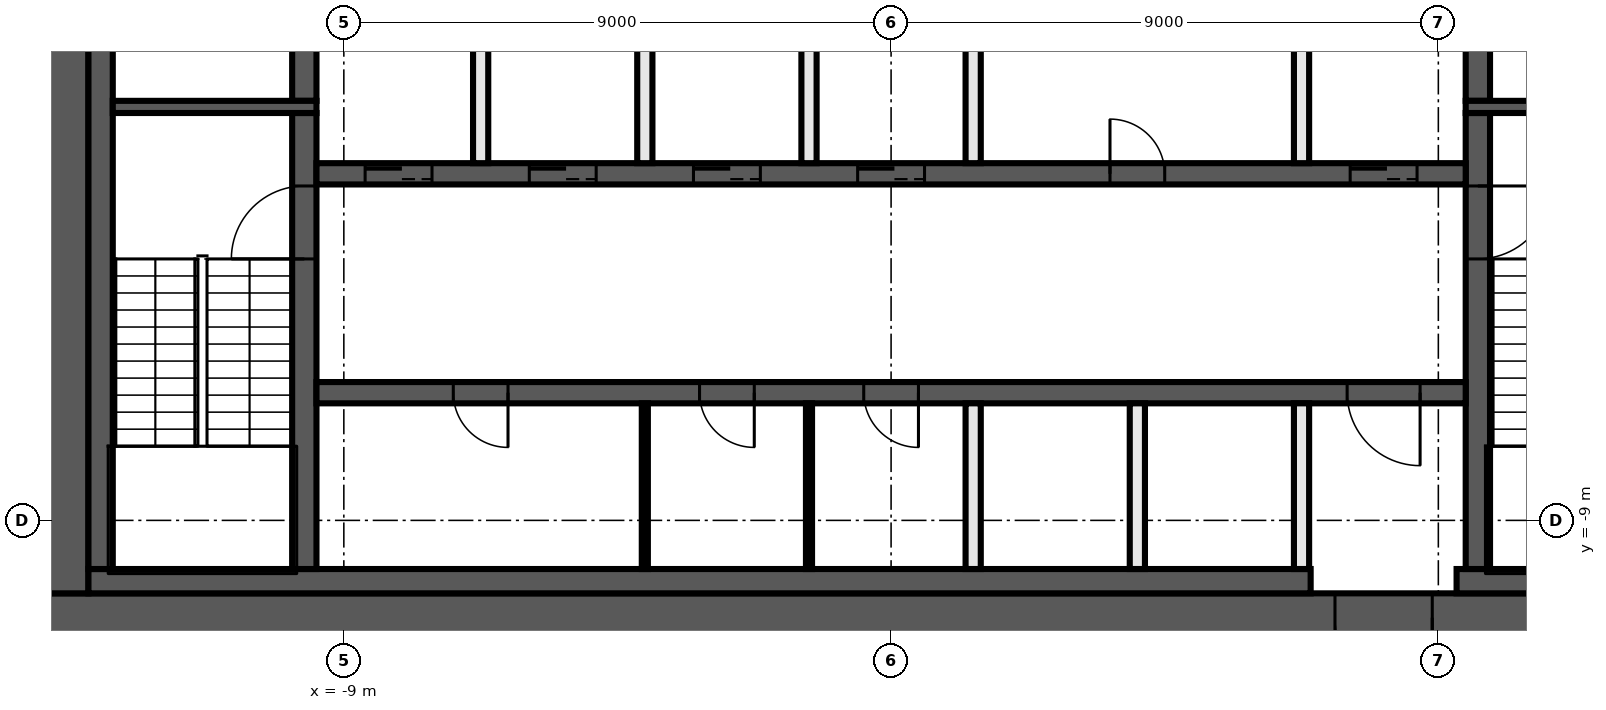
"""IFC4 building model, lengths in metres.
Left out: names, types, materials, properties, quantities, classifications, styles, units other than length and angle.
Written with IfcOpenShell. Run it as: python <this file> out.ifc"""

import sys

from ifc_helpers import new_model, si_unit, direction, frame, frame_2d, origin, place, context, subcontext, project, spatial, rectangle, extrude, element, fill, save


model = new_model("IFC4")
c1 = context("Model", 3, precision=1e-05, world=origin(), true_north=direction((0.0, 1.0)))
c2 = subcontext(c1, "Body", "Model", "MODEL_VIEW")
j1 = project(units=[si_unit("LENGTHUNIT", "METRE"), si_unit("PLANEANGLEUNIT", "RADIAN")], contexts=[c1])
p1 = place(None, origin())
s1 = spatial("IfcSite", under=j1, at=p1, CompositionType="ELEMENT")
p2 = place(p1, origin())
s2 = spatial("IfcBuilding", under=s1, at=p2, CompositionType="ELEMENT")
p3 = place(p2, frame((0.0, 0.0, 211.4)))
s3 = spatial("IfcBuildingStorey", under=s2, at=p3, CompositionType="ELEMENT", Elevation=211.4)
p4 = place(p3, frame((14.0, -10.6, 0.0), z_axis=(0.0, 0.0, 1.0), x_axis=(-1.0, 0.0, 0.0)))
e1 = element("IfcWall", 1, at=p4, inside=s3, PredefinedType="SHEAR", context=c2, shape_type="SweptSolid", body=[
    extrude(rectangle(XDim=28.0, YDim=0.8, at=frame_2d((14.0, 0.0))), origin(), (0.0, 0.0, 1.0), 3.82),
])
p5 = place(p4, frame((5.1, 0.0, 0.0)))
e2 = element("IfcOpeningElement", 2, at=p5, cuts=e1, PredefinedType="OPENING", context=c2, shape_type="SweptSolid", body=[
    extrude(rectangle(XDim=1.6, YDim=2.1, at=frame_2d((0.8, 1.05))), frame((0.0, 0.41, 0.0), z_axis=(0.0, -1.0, 0.0), x_axis=(1.0, 0.0, 0.0)), (0.0, 0.0, 1.0), 0.82),
])
p6 = place(p3, frame((-13.6, -10.2, 0.0), z_axis=(0.0, 0.0, 1.0), x_axis=(0.0, 1.0, 0.0)))
e3 = element("IfcWall", 3, at=p6, inside=s3, PredefinedType="SHEAR", context=c2, shape_type="SweptSolid", body=[
    extrude(rectangle(XDim=20.4, YDim=0.8, at=frame_2d((10.2, 0.0))), origin(), (0.0, 0.0, 1.0), 3.82),
])
p7 = place(p3, frame((13.2, -10.0, 0.0), z_axis=(0.0, 0.0, 1.0), x_axis=(-1.0, 0.0, 0.0)))
e4 = element("IfcWall", 4, at=p7, inside=s3, PredefinedType="SHEAR", context=c2, shape_type="SweptSolid", body=[
    extrude(rectangle(XDim=3.9, YDim=0.4, at=frame_2d((1.95, 0.0))), origin(), (0.0, 0.0, 1.0), 3.82),
])
p8 = place(p3, frame((6.9, -10.0, 0.0), z_axis=(0.0, 0.0, 1.0), x_axis=(-1.0, 0.0, 0.0)))
e5 = element("IfcWall", 5, at=p8, inside=s3, PredefinedType="SHEAR", context=c2, shape_type="SweptSolid", body=[
    extrude(rectangle(XDim=20.1, YDim=0.4, at=frame_2d((10.05, 0.0))), origin(), (0.0, 0.0, 1.0), 3.82),
])
p9 = place(p3, frame((-13.0, -9.8, 0.0), z_axis=(0.0, 0.0, 1.0), x_axis=(0.0, 1.0, 0.0)))
e6 = element("IfcWall", 6, at=p9, inside=s3, PredefinedType="SHEAR", context=c2, shape_type="SweptSolid", body=[
    extrude(rectangle(XDim=19.6, YDim=0.4, at=frame_2d((9.8, 0.0))), origin(), (0.0, 0.0, 1.0), 3.82),
])
p10 = place(p3, frame((9.65, -2.3, 0.0), z_axis=(0.0, 0.0, 1.0), x_axis=(0.0, -1.0, 0.0)))
e7 = element("IfcWall", 7, at=p10, inside=s3, PredefinedType="SHEAR", context=c2, shape_type="SweptSolid", body=[
    extrude(rectangle(XDim=7.5, YDim=0.4, at=frame_2d((3.75, 0.0))), origin(), (0.0, 0.0, 1.0), 3.82),
])
p11 = place(p10, frame((1.2, 0.0, 0.0)))
e8 = element("IfcOpeningElement", 8, at=p11, cuts=e7, PredefinedType="OPENING", context=c2, shape_type="SweptSolid", body=[
    extrude(rectangle(XDim=1.2, YDim=2.1, at=frame_2d((0.6, 1.05))), frame((0.0, 0.21, 0.0), z_axis=(0.0, -1.0, 0.0), x_axis=(1.0, 0.0, 0.0)), (0.0, 0.0, 1.0), 0.42),
])
p12 = place(p3, frame((9.65, 2.1, 0.0), z_axis=(0.0, 0.0, 1.0), x_axis=(0.0, -1.0, 0.0)))
e9 = element("IfcWall", 9, at=p12, inside=s3, PredefinedType="SHEAR", context=c2, shape_type="SweptSolid", body=[
    extrude(rectangle(XDim=4.2, YDim=0.4, at=frame_2d((2.1, 0.0))), origin(), (0.0, 0.0, 1.0), 3.82),
])
p13 = place(p12, frame((0.15, 0.0, 0.0)))
e10 = element("IfcOpeningElement", 10, at=p13, cuts=e9, PredefinedType="OPENING", context=c2, shape_type="SweptSolid", body=[
    extrude(rectangle(XDim=0.9, YDim=2.1, at=frame_2d((0.45, 1.05))), frame((0.0, 0.21, 0.0), z_axis=(0.0, -1.0, 0.0), x_axis=(1.0, 0.0, 0.0)), (0.0, 0.0, 1.0), 0.42),
])
p14 = place(p3, frame((-9.65, -9.8, 0.0), z_axis=(0.0, 0.0, 1.0), x_axis=(0.0, 1.0, 0.0)))
e11 = element("IfcWall", 11, at=p14, inside=s3, PredefinedType="SHEAR", context=c2, shape_type="SweptSolid", body=[
    extrude(rectangle(XDim=7.5, YDim=0.4, at=frame_2d((3.75, 0.0))), origin(), (0.0, 0.0, 1.0), 3.82),
])
p15 = place(p14, frame((5.1, 0.0, 0.0)))
e12 = element("IfcOpeningElement", 12, at=p15, cuts=e11, PredefinedType="OPENING", context=c2, shape_type="SweptSolid", body=[
    extrude(rectangle(XDim=1.2, YDim=2.1, at=frame_2d((0.6, 1.05))), frame((0.0, 0.21, 0.0), z_axis=(0.0, -1.0, 0.0), x_axis=(1.0, 0.0, 0.0)), (0.0, 0.0, 1.0), 0.42),
])
p16 = place(p3, frame((-9.65, -2.1, 0.0), z_axis=(0.0, 0.0, 1.0), x_axis=(0.0, 1.0, 0.0)))
e13 = element("IfcWall", 13, at=p16, inside=s3, PredefinedType="SHEAR", context=c2, shape_type="SweptSolid", body=[
    extrude(rectangle(XDim=4.2, YDim=0.4, at=frame_2d((2.1, 0.0))), origin(), (0.0, 0.0, 1.0), 3.82),
])
for number, where, z_axis, x_axis in (
    (14, (9.45, -2.2, 0.0), (0.0, 0.0, 1.0), (1.0, 0.0, 0.0)),
    (15, (-9.45, -2.2, 0.0), (0.0, 0.0, 1.0), (-1.0, 0.0, 0.0)),
):
    element("IfcWall", number, at=place(p3, frame(where, z_axis=z_axis, x_axis=x_axis)), inside=s3, PredefinedType="SHEAR", context=c2, shape_type="SweptSolid", body=[
        extrude(rectangle(XDim=3.35, YDim=0.2, at=frame_2d((1.675, 0.0))), origin(), (0.0, 0.0, 1.0), 3.82),
    ])
p17 = place(p3, frame((-9.45, -3.3, 0.0), z_axis=(0.0, 0.0, 1.0), x_axis=(1.0, 0.0, 0.0)))
e16 = element("IfcWall", 16, at=p17, inside=s3, PredefinedType="SHEAR", context=c2, shape_type="SweptSolid", body=[
    extrude(rectangle(XDim=18.9, YDim=0.35, at=frame_2d((9.45, 0.0))), origin(), (0.0, 0.0, 1.0), 3.82),
])
p18 = place(p17, frame((0.8, 0.0, 0.0)))
e17 = element("IfcOpeningElement", 17, at=p18, cuts=e16, PredefinedType="OPENING", context=c2, shape_type="SweptSolid", body=[
    extrude(rectangle(XDim=1.1, YDim=2.1, at=frame_2d((0.55, 1.05))), frame((0.0, 0.185, 0.0), z_axis=(0.0, -1.0, 0.0), x_axis=(1.0, 0.0, 0.0)), (0.0, 0.0, 1.0), 0.37),
])
p19 = place(p17, frame((3.5, 0.0, 0.0)))
e18 = element("IfcOpeningElement", 18, at=p19, cuts=e16, PredefinedType="OPENING", context=c2, shape_type="SweptSolid", body=[
    extrude(rectangle(XDim=1.1, YDim=2.1, at=frame_2d((0.55, 1.05))), frame((0.0, 0.185, 0.0), z_axis=(0.0, -1.0, 0.0), x_axis=(1.0, 0.0, 0.0)), (0.0, 0.0, 1.0), 0.37),
])
p20 = place(p17, frame((6.2, 0.0, 0.0)))
e19 = element("IfcOpeningElement", 19, at=p20, cuts=e16, PredefinedType="OPENING", context=c2, shape_type="SweptSolid", body=[
    extrude(rectangle(XDim=1.1, YDim=2.1, at=frame_2d((0.55, 1.05))), frame((0.0, 0.185, 0.0), z_axis=(0.0, -1.0, 0.0), x_axis=(1.0, 0.0, 0.0)), (0.0, 0.0, 1.0), 0.37),
])
p21 = place(p17, frame((8.9, 0.0, 0.0)))
e20 = element("IfcOpeningElement", 20, at=p21, cuts=e16, PredefinedType="OPENING", context=c2, shape_type="SweptSolid", body=[
    extrude(rectangle(XDim=1.1, YDim=2.1, at=frame_2d((0.55, 1.05))), frame((0.0, 0.185, 0.0), z_axis=(0.0, -1.0, 0.0), x_axis=(1.0, 0.0, 0.0)), (0.0, 0.0, 1.0), 0.37),
])
p22 = place(p17, frame((17.0, 0.0, 0.0)))
e21 = element("IfcOpeningElement", 21, at=p22, cuts=e16, PredefinedType="OPENING", context=c2, shape_type="SweptSolid", body=[
    extrude(rectangle(XDim=1.1, YDim=2.1, at=frame_2d((0.55, 1.05))), frame((0.0, 0.185, 0.0), z_axis=(0.0, -1.0, 0.0), x_axis=(1.0, 0.0, 0.0)), (0.0, 0.0, 1.0), 0.37),
])
p23 = place(p17, frame((13.05, 0.0, 0.0)))
e22 = element("IfcOpeningElement", 22, at=p23, cuts=e16, PredefinedType="OPENING", context=c2, shape_type="SweptSolid", body=[
    extrude(rectangle(XDim=0.9, YDim=2.1, at=frame_2d((0.45, 1.05))), frame((0.0, 0.185, 0.0), z_axis=(0.0, -1.0, 0.0), x_axis=(1.0, 0.0, 0.0)), (0.0, 0.0, 1.0), 0.37),
])
p24 = place(p3, frame((9.45, -6.9, 0.0), z_axis=(0.0, 0.0, 1.0), x_axis=(-1.0, 0.0, 0.0)))
e23 = element("IfcWall", 23, at=p24, inside=s3, PredefinedType="SHEAR", context=c2, shape_type="SweptSolid", body=[
    extrude(rectangle(XDim=18.9, YDim=0.35, at=frame_2d((9.45, 0.0))), origin(), (0.0, 0.0, 1.0), 3.82),
])
p25 = place(p24, frame((0.75, 0.0, 0.0)))
e24 = element("IfcOpeningElement", 24, at=p25, cuts=e23, PredefinedType="OPENING", context=c2, shape_type="SweptSolid", body=[
    extrude(rectangle(XDim=1.2, YDim=2.1, at=frame_2d((0.6, 1.05))), frame((0.0, 0.185, 0.0), z_axis=(0.0, -1.0, 0.0), x_axis=(1.0, 0.0, 0.0)), (0.0, 0.0, 1.0), 0.37),
])
p26 = place(p24, frame((15.75, 0.0, 0.0)))
e25 = element("IfcOpeningElement", 25, at=p26, cuts=e23, PredefinedType="OPENING", context=c2, shape_type="SweptSolid", body=[
    extrude(rectangle(XDim=0.9, YDim=2.1, at=frame_2d((0.45, 1.05))), frame((0.0, 0.185, 0.0), z_axis=(0.0, -1.0, 0.0), x_axis=(1.0, 0.0, 0.0)), (0.0, 0.0, 1.0), 0.37),
])
p27 = place(p24, frame((11.7, 0.0, 0.0)))
e26 = element("IfcOpeningElement", 26, at=p27, cuts=e23, PredefinedType="OPENING", context=c2, shape_type="SweptSolid", body=[
    extrude(rectangle(XDim=0.9, YDim=2.1, at=frame_2d((0.45, 1.05))), frame((0.0, 0.185, 0.0), z_axis=(0.0, -1.0, 0.0), x_axis=(1.0, 0.0, 0.0)), (0.0, 0.0, 1.0), 0.37),
])
p28 = place(p24, frame((9.0, 0.0, 0.0)))
e27 = element("IfcOpeningElement", 27, at=p28, cuts=e23, PredefinedType="OPENING", context=c2, shape_type="SweptSolid", body=[
    extrude(rectangle(XDim=0.9, YDim=2.1, at=frame_2d((0.45, 1.05))), frame((0.0, 0.185, 0.0), z_axis=(0.0, -1.0, 0.0), x_axis=(1.0, 0.0, 0.0)), (0.0, 0.0, 1.0), 0.37),
])
for number, where, z_axis, x_axis in (
    (28, (6.75, -9.8, 0.0), (0.0, 0.0, 1.0), (0.0, 1.0, 0.0)),
    (29, (6.75, -3.125, 0.0), (0.0, 0.0, 1.0), (0.0, 1.0, 0.0)),
    (30, (4.05, -9.8, 0.0), (0.0, 0.0, 1.0), (0.0, 1.0, 0.0)),
    (31, (1.35, -9.8, 0.0), (0.0, 0.0, 1.0), (0.0, 1.0, 0.0)),
    (32, (1.35, -3.125, 0.0), (0.0, 0.0, 1.0), (0.0, 1.0, 0.0)),
):
    element("IfcWall", number, at=place(p3, frame(where, z_axis=z_axis, x_axis=x_axis)), inside=s3, PredefinedType="SOLIDWALL", context=c2, shape_type="SweptSolid", body=[
        extrude(rectangle(XDim=2.725, YDim=0.25, at=frame_2d((1.363, 0.0))), origin(), (0.0, 0.0, 1.0), 3.82),
    ])
p29 = place(p3, frame((-1.35, -9.8, 0.0), z_axis=(0.0, 0.0, 1.0), x_axis=(0.0, 1.0, 0.0)))
e33 = element("IfcWall", 33, at=p29, inside=s3, PredefinedType="PARTITIONING", context=c2, shape_type="SweptSolid", body=[
    extrude(rectangle(XDim=2.725, YDim=0.1, at=frame_2d((1.363, 0.0))), origin(), (0.0, 0.0, 1.0), 3.82),
])
p30 = place(p3, frame((-1.35, -3.125, 0.0), z_axis=(0.0, 0.0, 1.0), x_axis=(0.0, 1.0, 0.0)))
e34 = element("IfcWall", 34, at=p30, inside=s3, PredefinedType="SOLIDWALL", context=c2, shape_type="SweptSolid", body=[
    extrude(rectangle(XDim=2.725, YDim=0.25, at=frame_2d((1.363, 0.0))), origin(), (0.0, 0.0, 1.0), 3.82),
])
p31 = place(p3, frame((-4.05, -9.8, 0.0), z_axis=(0.0, 0.0, 1.0), x_axis=(0.0, 1.0, 0.0)))
e35 = element("IfcWall", 35, at=p31, inside=s3, PredefinedType="PARTITIONING", context=c2, shape_type="SweptSolid", body=[
    extrude(rectangle(XDim=2.725, YDim=0.1, at=frame_2d((1.363, 0.0))), origin(), (0.0, 0.0, 1.0), 3.82),
])
for number, where, z_axis, x_axis in (
    (36, (-4.05, -3.125, 0.0), (0.0, 0.0, 1.0), (0.0, 1.0, 0.0)),
    (37, (-6.75, -3.125, 0.0), (0.0, 0.0, 1.0), (0.0, 1.0, 0.0)),
):
    element("IfcWall", number, at=place(p3, frame(where, z_axis=z_axis, x_axis=x_axis)), inside=s3, PredefinedType="SOLIDWALL", context=c2, shape_type="SweptSolid", body=[
        extrude(rectangle(XDim=2.725, YDim=0.25, at=frame_2d((1.363, 0.0))), origin(), (0.0, 0.0, 1.0), 3.82),
    ])
p32 = place(p18, origin())
e38 = element("IfcDoor", 38, at=p32, inside=s3, OperationType="DOUBLE_DOOR_SLIDING", PredefinedType="DOOR", context=c2, shape_type="SweptSolid", body=[
    extrude(rectangle(XDim=1.1, YDim=2.1, at=frame_2d((0.55, 1.05))), frame((0.0, 0.025, 0.0), z_axis=(0.0, -1.0, 0.0), x_axis=(1.0, 0.0, 0.0)), (0.0, 0.0, 1.0), 0.05),
])
fill(e17, e38)
p33 = place(p19, origin())
e39 = element("IfcDoor", 39, at=p33, inside=s3, OperationType="DOUBLE_DOOR_SLIDING", PredefinedType="DOOR", context=c2, shape_type="SweptSolid", body=[
    extrude(rectangle(XDim=1.1, YDim=2.1, at=frame_2d((0.55, 1.05))), frame((0.0, 0.025, 0.0), z_axis=(0.0, -1.0, 0.0), x_axis=(1.0, 0.0, 0.0)), (0.0, 0.0, 1.0), 0.05),
])
fill(e18, e39)
p34 = place(p20, origin())
e40 = element("IfcDoor", 40, at=p34, inside=s3, OperationType="DOUBLE_DOOR_SLIDING", PredefinedType="DOOR", context=c2, shape_type="SweptSolid", body=[
    extrude(rectangle(XDim=1.1, YDim=2.1, at=frame_2d((0.55, 1.05))), frame((0.0, 0.025, 0.0), z_axis=(0.0, -1.0, 0.0), x_axis=(1.0, 0.0, 0.0)), (0.0, 0.0, 1.0), 0.05),
])
fill(e19, e40)
p35 = place(p21, origin())
e41 = element("IfcDoor", 41, at=p35, inside=s3, OperationType="DOUBLE_DOOR_SLIDING", PredefinedType="DOOR", context=c2, shape_type="SweptSolid", body=[
    extrude(rectangle(XDim=1.1, YDim=2.1, at=frame_2d((0.55, 1.05))), frame((0.0, 0.025, 0.0), z_axis=(0.0, -1.0, 0.0), x_axis=(1.0, 0.0, 0.0)), (0.0, 0.0, 1.0), 0.05),
])
fill(e20, e41)
p36 = place(p22, origin())
e42 = element("IfcDoor", 42, at=p36, inside=s3, OperationType="DOUBLE_DOOR_SLIDING", PredefinedType="DOOR", context=c2, shape_type="SweptSolid", body=[
    extrude(rectangle(XDim=1.1, YDim=2.1, at=frame_2d((0.55, 1.05))), frame((0.0, 0.025, 0.0), z_axis=(0.0, -1.0, 0.0), x_axis=(1.0, 0.0, 0.0)), (0.0, 0.0, 1.0), 0.05),
])
fill(e21, e42)
p37 = place(p5, origin())
e43 = element("IfcDoor", 43, at=p37, inside=s3, OperationType="DOUBLE_DOOR_SINGLE_SWING", PredefinedType="DOOR", context=c2, shape_type="SweptSolid", body=[
    extrude(rectangle(XDim=1.6, YDim=2.1, at=frame_2d((0.8, 1.05))), frame((0.0, 0.025, 0.0), z_axis=(0.0, -1.0, 0.0), x_axis=(1.0, 0.0, 0.0)), (0.0, 0.0, 1.0), 0.05),
])
fill(e2, e43)
p38 = place(p25, origin())
e44 = element("IfcDoor", 44, at=p38, inside=s3, OperationType="SINGLE_SWING_LEFT", PredefinedType="DOOR", context=c2, shape_type="SweptSolid", body=[
    extrude(rectangle(XDim=1.2, YDim=2.1, at=frame_2d((0.6, 1.05))), frame((0.0, 0.025, 0.0), z_axis=(0.0, -1.0, 0.0), x_axis=(1.0, 0.0, 0.0)), (0.0, 0.0, 1.0), 0.05),
])
fill(e24, e44)
p39 = place(p23, origin())
e45 = element("IfcDoor", 45, at=p39, inside=s3, OperationType="SINGLE_SWING_RIGHT", PredefinedType="DOOR", context=c2, shape_type="SweptSolid", body=[
    extrude(rectangle(XDim=0.9, YDim=2.1, at=frame_2d((0.45, 1.05))), frame((0.0, 0.025, 0.0), z_axis=(0.0, -1.0, 0.0), x_axis=(1.0, 0.0, 0.0)), (0.0, 0.0, 1.0), 0.05),
])
fill(e22, e45)
p40 = place(p26, origin())
e46 = element("IfcDoor", 46, at=p40, inside=s3, OperationType="SINGLE_SWING_LEFT", PredefinedType="DOOR", context=c2, shape_type="SweptSolid", body=[
    extrude(rectangle(XDim=0.9, YDim=2.1, at=frame_2d((0.45, 1.05))), frame((0.0, 0.025, 0.0), z_axis=(0.0, -1.0, 0.0), x_axis=(1.0, 0.0, 0.0)), (0.0, 0.0, 1.0), 0.05),
])
fill(e25, e46)
p41 = place(p27, origin())
e47 = element("IfcDoor", 47, at=p41, inside=s3, OperationType="SINGLE_SWING_RIGHT", PredefinedType="DOOR", context=c2, shape_type="SweptSolid", body=[
    extrude(rectangle(XDim=0.9, YDim=2.1, at=frame_2d((0.45, 1.05))), frame((0.0, 0.025, 0.0), z_axis=(0.0, -1.0, 0.0), x_axis=(1.0, 0.0, 0.0)), (0.0, 0.0, 1.0), 0.05),
])
fill(e26, e47)
p42 = place(p28, origin())
e48 = element("IfcDoor", 48, at=p42, inside=s3, OperationType="SINGLE_SWING_LEFT", PredefinedType="DOOR", context=c2, shape_type="SweptSolid", body=[
    extrude(rectangle(XDim=0.9, YDim=2.1, at=frame_2d((0.45, 1.05))), frame((0.0, 0.025, 0.0), z_axis=(0.0, -1.0, 0.0), x_axis=(1.0, 0.0, 0.0)), (0.0, 0.0, 1.0), 0.05),
])
fill(e27, e48)
p43 = place(p11, origin())
e49 = element("IfcDoor", 49, at=p43, inside=s3, OperationType="SINGLE_SWING_RIGHT", PredefinedType="DOOR", context=c2, shape_type="SweptSolid", body=[
    extrude(rectangle(XDim=1.2, YDim=2.1, at=frame_2d((0.6, 1.05))), frame((0.0, 0.025, 0.0), z_axis=(0.0, -1.0, 0.0), x_axis=(1.0, 0.0, 0.0)), (0.0, 0.0, 1.0), 0.05),
])
fill(e8, e49)
p44 = place(p15, origin())
e50 = element("IfcDoor", 50, at=p44, inside=s3, OperationType="SINGLE_SWING_LEFT", PredefinedType="DOOR", context=c2, shape_type="SweptSolid", body=[
    extrude(rectangle(XDim=1.2, YDim=2.1, at=frame_2d((0.6, 1.05))), frame((0.0, 0.025, 0.0), z_axis=(0.0, -1.0, 0.0), x_axis=(1.0, 0.0, 0.0)), (0.0, 0.0, 1.0), 0.05),
])
fill(e12, e50)
save(model, sys.argv[1])
